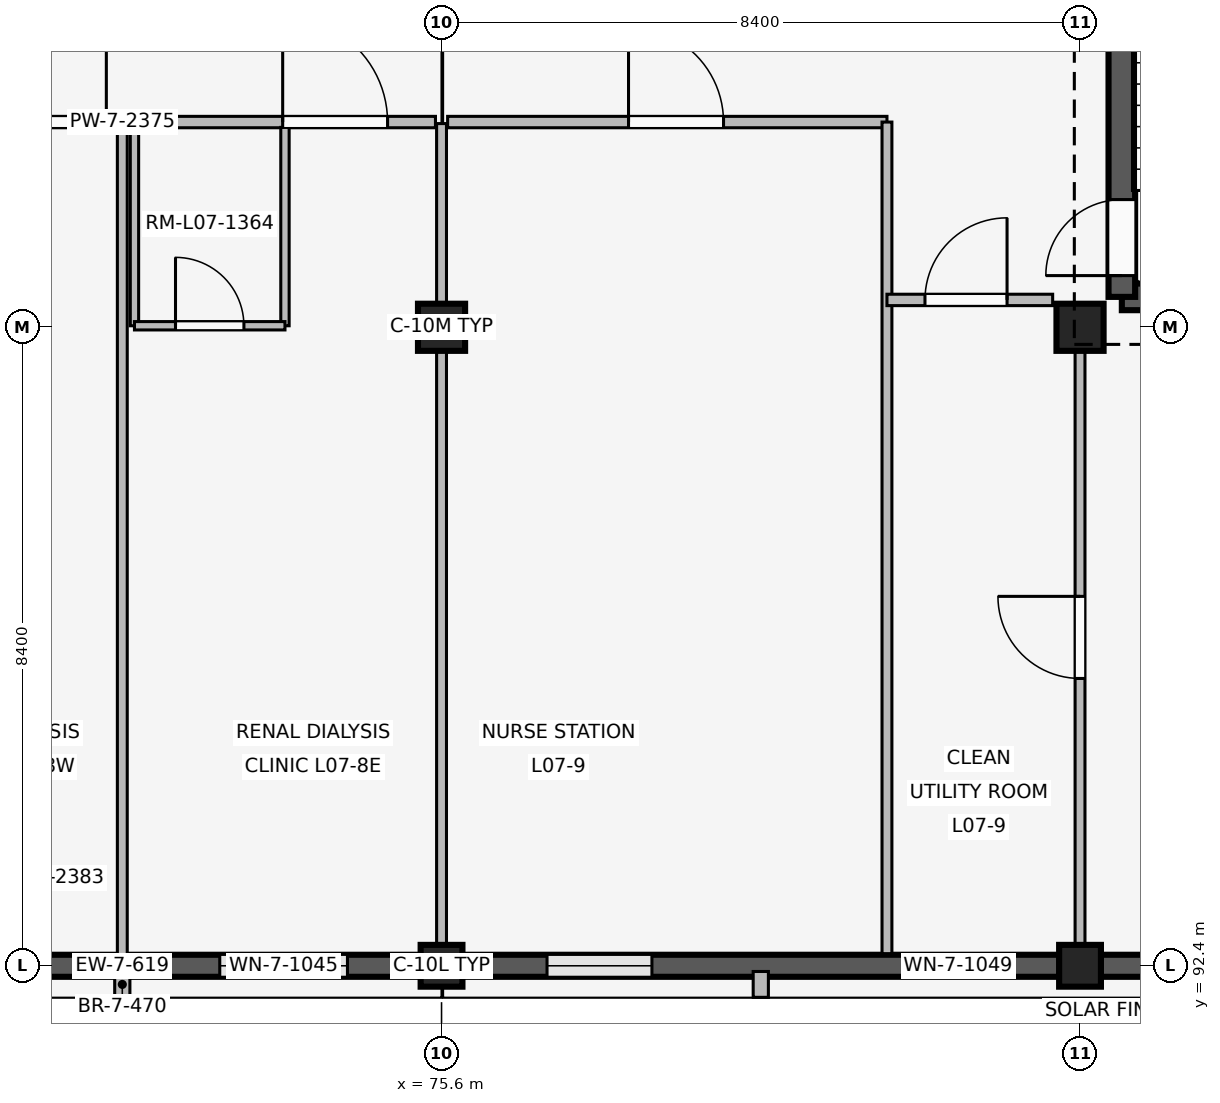
"""IFC4 building model, lengths in metres.
Left out: names, types, materials, properties, quantities, classifications, styles, units other than length and angle.
Written with IfcOpenShell. Run it as: python <this file> out.ifc"""

import sys

from ifc_helpers import new_model, si_unit, direction, frame, frame_2d, origin, origin_2d, place, context, subcontext, project, spatial, rectangle, extrude, element, fill, save


model = new_model("IFC4")
c1 = context("Model", 3, precision=1e-05, world=origin(), true_north=direction((0.0, 1.0)))
c2 = subcontext(c1, "Body", "Model", "MODEL_VIEW")
j1 = project(units=[si_unit("LENGTHUNIT", "METRE"), si_unit("PLANEANGLEUNIT", "RADIAN")], contexts=[c1])
p1 = place(None, origin())
s1 = spatial("IfcSite", under=j1, at=p1, CompositionType="ELEMENT")
p2 = place(p1, origin())
s2 = spatial("IfcBuilding", under=s1, at=p2, CompositionType="ELEMENT")
p3 = place(p2, frame((0.0, 0.0, 28.8)))
s3 = spatial("IfcBuildingStorey", under=s2, at=p3, CompositionType="ELEMENT", Elevation=28.8)
p4 = place(p3, frame((75.6, 92.4, 0.0), z_axis=(0.0, 0.0, 1.0), x_axis=(1.0, 0.0, 0.0)))
e1 = element("IfcColumn", 1, at=p4, inside=s3, PredefinedType="COLUMN", context=c2, shape_type="SweptSolid", body=[
    extrude(rectangle(XDim=0.55, YDim=0.55, at=origin_2d()), origin(), (0.0, 0.0, 1.0), 4.2),
])
p5 = place(p3, frame((75.6, 100.8, 0.0), z_axis=(0.0, 0.0, 1.0), x_axis=(1.0, 0.0, 0.0)))
e2 = element("IfcColumn", 2, at=p5, inside=s3, PredefinedType="COLUMN", context=c2, shape_type="SweptSolid", body=[
    extrude(rectangle(XDim=0.62, YDim=0.62, at=origin_2d()), origin(), (0.0, 0.0, 1.0), 4.2),
])
p6 = place(p3, frame((84.0, 92.4, 0.0), z_axis=(0.0, 0.0, 1.0), x_axis=(1.0, 0.0, 0.0)))
e3 = element("IfcColumn", 3, at=p6, inside=s3, PredefinedType="COLUMN", context=c2, shape_type="SweptSolid", body=[
    extrude(rectangle(XDim=0.55, YDim=0.55, at=origin_2d()), origin(), (0.0, 0.0, 1.0), 4.2),
])
p7 = place(p3, frame((84.0, 100.8, 0.0), z_axis=(0.0, 0.0, 1.0), x_axis=(1.0, 0.0, 0.0)))
e4 = element("IfcColumn", 4, at=p7, inside=s3, PredefinedType="COLUMN", context=c2, shape_type="SweptSolid", body=[
    extrude(rectangle(XDim=0.62, YDim=0.62, at=origin_2d()), origin(), (0.0, 0.0, 1.0), 4.2),
])
p8 = place(p3, frame((75.33, 92.4, 0.0), z_axis=(0.0, 0.0, 1.0), x_axis=(-1.0, 0.0, 0.0)))
e5 = element("IfcWall", 5, at=p8, inside=s3, PredefinedType="SOLIDWALL", context=c2, shape_type="SweptSolid", body=[
    extrude(rectangle(XDim=7.86, YDim=0.29, at=frame_2d((3.93, 0.0))), origin(), (0.0, 0.0, 1.0), 3.34),
])
p9 = place(p8, frame((0.968, 0.0, 0.85)))
e6 = element("IfcOpeningElement", 6, at=p9, cuts=e5, PredefinedType="OPENING", context=c2, shape_type="SweptSolid", body=[
    extrude(rectangle(XDim=1.68, YDim=2.05, at=frame_2d((0.84, 1.025))), frame((0.0, 0.155, 0.0), z_axis=(0.0, -1.0, 0.0), x_axis=(1.0, 0.0, 0.0)), (0.0, 0.0, 1.0), 0.31),
])
p10 = place(p8, frame((5.212, 0.0, 0.85)))
e7 = element("IfcOpeningElement", 7, at=p10, cuts=e5, PredefinedType="OPENING", context=c2, shape_type="SweptSolid", body=[
    extrude(rectangle(XDim=1.68, YDim=2.05, at=frame_2d((0.84, 1.025))), frame((0.0, 0.155, 0.0), z_axis=(0.0, -1.0, 0.0), x_axis=(1.0, 0.0, 0.0)), (0.0, 0.0, 1.0), 0.31),
])
p11 = place(p3, frame((71.4, 92.325, 0.0), z_axis=(0.0, 0.0, 1.0), x_axis=(0.0, -1.0, 0.0)))
e8 = element("IfcWall", 8, at=p11, inside=s3, PredefinedType="ELEMENTEDWALL", context=c2, shape_type="SweptSolid", body=[
    extrude(rectangle(XDim=0.34, YDim=0.2, at=frame_2d((0.17, 0.0))), origin(), (0.0, 0.0, 1.0), 3.32),
])
p12 = place(p3, frame((83.73, 92.4, 0.0), z_axis=(0.0, 0.0, 1.0), x_axis=(-1.0, 0.0, 0.0)))
e9 = element("IfcWall", 9, at=p12, inside=s3, PredefinedType="SOLIDWALL", context=c2, shape_type="SweptSolid", body=[
    extrude(rectangle(XDim=7.86, YDim=0.29, at=frame_2d((3.93, 0.0))), origin(), (0.0, 0.0, 1.0), 3.34),
])
p13 = place(p12, frame((0.645, 0.0, 0.85)))
e10 = element("IfcOpeningElement", 10, at=p13, cuts=e9, PredefinedType="OPENING", context=c2, shape_type="SweptSolid", body=[
    extrude(rectangle(XDim=1.38, YDim=1.5, at=frame_2d((0.69, 0.75))), frame((0.0, 0.155, 0.0), z_axis=(0.0, -1.0, 0.0), x_axis=(1.0, 0.0, 0.0)), (0.0, 0.0, 1.0), 0.31),
])
p14 = place(p12, frame((5.362, 0.0, 0.85)))
e11 = element("IfcOpeningElement", 11, at=p14, cuts=e9, PredefinedType="OPENING", context=c2, shape_type="SweptSolid", body=[
    extrude(rectangle(XDim=1.38, YDim=1.5, at=frame_2d((0.69, 0.75))), frame((0.0, 0.155, 0.0), z_axis=(0.0, -1.0, 0.0), x_axis=(1.0, 0.0, 0.0)), (0.0, 0.0, 1.0), 0.31),
])
p15 = place(p3, frame((79.8, 92.325, 0.0), z_axis=(0.0, 0.0, 1.0), x_axis=(0.0, -1.0, 0.0)))
e12 = element("IfcWall", 12, at=p15, inside=s3, PredefinedType="ELEMENTEDWALL", context=c2, shape_type="SweptSolid", body=[
    extrude(rectangle(XDim=0.34, YDim=0.2, at=frame_2d((0.17, 0.0))), origin(), (0.0, 0.0, 1.0), 3.32),
])
p16 = place(p3, frame((92.13, 92.4, 0.0), z_axis=(0.0, 0.0, 1.0), x_axis=(-1.0, 0.0, 0.0)))
e13 = element("IfcWall", 13, at=p16, inside=s3, PredefinedType="SOLIDWALL", context=c2, shape_type="SweptSolid", body=[
    extrude(rectangle(XDim=7.86, YDim=0.29, at=frame_2d((3.93, 0.0))), origin(), (0.0, 0.0, 1.0), 3.34),
])
p17 = place(p16, frame((1.028, 0.0, 0.85)))
e14 = element("IfcOpeningElement", 14, at=p17, cuts=e13, PredefinedType="OPENING", context=c2, shape_type="SweptSolid", body=[
    extrude(rectangle(XDim=1.56, YDim=1.7, at=frame_2d((0.78, 0.85))), frame((0.0, 0.155, 0.0), z_axis=(0.0, -1.0, 0.0), x_axis=(1.0, 0.0, 0.0)), (0.0, 0.0, 1.0), 0.31),
])
p18 = place(p16, frame((5.272, 0.0, 0.85)))
e15 = element("IfcOpeningElement", 15, at=p18, cuts=e13, PredefinedType="OPENING", context=c2, shape_type="SweptSolid", body=[
    extrude(rectangle(XDim=1.56, YDim=1.7, at=frame_2d((0.78, 0.85))), frame((0.0, 0.155, 0.0), z_axis=(0.0, -1.0, 0.0), x_axis=(1.0, 0.0, 0.0)), (0.0, 0.0, 1.0), 0.31),
])
p19 = place(p3, frame((84.55, 101.2, 0.0), z_axis=(0.0, 0.0, 1.0), x_axis=(1.0, 0.0, 0.0)))
e16 = element("IfcWall", 16, at=p19, inside=s3, PredefinedType="SHEAR", context=c2, shape_type="SweptSolid", body=[
    extrude(rectangle(XDim=7.5, YDim=0.35, at=frame_2d((3.75, 0.0))), origin(), (0.0, 0.0, 1.0), 3.94),
])
p20 = place(p19, frame((4.85, 0.0, 0.0)))
e17 = element("IfcOpeningElement", 17, at=p20, cuts=e16, PredefinedType="OPENING", context=c2, shape_type="SweptSolid", body=[
    extrude(rectangle(XDim=1.2, YDim=2.2, at=frame_2d((0.6, 1.1))), frame((0.0, 0.185, 0.0), z_axis=(0.0, -1.0, 0.0), x_axis=(1.0, 0.0, 0.0)), (0.0, 0.0, 1.0), 0.37),
])
p21 = place(p3, frame((84.55, 101.2, 0.0), z_axis=(0.0, 0.0, 1.0), x_axis=(0.0, 1.0, 0.0)))
e18 = element("IfcWall", 18, at=p21, inside=s3, PredefinedType="SHEAR", context=c2, shape_type="SweptSolid", body=[
    extrude(rectangle(XDim=7.55, YDim=0.35, at=frame_2d((3.775, 0.0))), origin(), (0.0, 0.0, 1.0), 3.94),
])
p22 = place(p21, frame((0.28, 0.0, 0.0)))
e19 = element("IfcOpeningElement", 19, at=p22, cuts=e18, PredefinedType="OPENING", context=c2, shape_type="SweptSolid", body=[
    extrude(rectangle(XDim=1.0, YDim=2.15, at=frame_2d((0.5, 1.075))), frame((0.0, 0.185, 0.0), z_axis=(0.0, -1.0, 0.0), x_axis=(1.0, 0.0, 0.0)), (0.0, 0.0, 1.0), 0.37),
])
p23 = place(p3, frame((67.28, 103.5, 0.0), z_axis=(0.0, 0.0, 1.0), x_axis=(1.0, 0.0, 0.0)))
e20 = element("IfcWall", 20, at=p23, inside=s3, PredefinedType="PARTITIONING", context=c2, shape_type="SweptSolid", body=[
    extrude(rectangle(XDim=8.24, YDim=0.15, at=frame_2d((4.12, 0.0))), origin(), (0.0, 0.0, 1.0), 3.32),
])
p24 = place(p23, frame((2.53, 0.0, 0.0)))
e21 = element("IfcOpeningElement", 21, at=p24, cuts=e20, PredefinedType="OPENING", context=c2, shape_type="SweptSolid", body=[
    extrude(rectangle(XDim=1.38, YDim=2.25, at=frame_2d((0.69, 1.125))), frame((0.0, 0.085, 0.0), z_axis=(0.0, -1.0, 0.0), x_axis=(1.0, 0.0, 0.0)), (0.0, 0.0, 1.0), 0.17),
])
p25 = place(p23, frame((6.23, 0.0, 0.0)))
e22 = element("IfcOpeningElement", 22, at=p25, cuts=e20, PredefinedType="OPENING", context=c2, shape_type="SweptSolid", body=[
    extrude(rectangle(XDim=1.38, YDim=2.25, at=frame_2d((0.69, 1.125))), frame((0.0, 0.085, 0.0), z_axis=(0.0, -1.0, 0.0), x_axis=(1.0, 0.0, 0.0)), (0.0, 0.0, 1.0), 0.17),
])
p26 = place(p3, frame((71.4, 92.5, 0.0), z_axis=(0.0, 0.0, 1.0), x_axis=(0.0, 1.0, 0.0)))
e23 = element("IfcWall", 23, at=p26, inside=s3, PredefinedType="PARTITIONING", context=c2, shape_type="SweptSolid", body=[
    extrude(rectangle(XDim=10.93, YDim=0.13, at=frame_2d((5.465, 0.0))), origin(), (0.0, 0.0, 1.0), 3.32),
])
for number, where, z_axis, x_axis in (
    (24, (71.56, 100.82, 0.0), (0.0, 0.0, 1.0), (0.0, 1.0, 0.0)),
    (25, (73.54, 100.82, 0.0), (0.0, 0.0, 1.0), (0.0, 1.0, 0.0)),
):
    element("IfcWall", number, at=place(p3, frame(where, z_axis=z_axis, x_axis=x_axis)), inside=s3, PredefinedType="PARTITIONING", context=c2, shape_type="SweptSolid", body=[
        extrude(rectangle(XDim=2.61, YDim=0.11, at=frame_2d((1.305, 0.0))), origin(), (0.0, 0.0, 1.0), 3.32),
    ])
p27 = place(p3, frame((71.56, 100.82, 0.0), z_axis=(0.0, 0.0, 1.0), x_axis=(1.0, 0.0, 0.0)))
e26 = element("IfcWall", 26, at=p27, inside=s3, PredefinedType="PARTITIONING", context=c2, shape_type="SweptSolid", body=[
    extrude(rectangle(XDim=1.98, YDim=0.11, at=frame_2d((0.99, 0.0))), origin(), (0.0, 0.0, 1.0), 3.32),
])
p28 = place(p27, frame((0.54, 0.0, 0.0)))
e27 = element("IfcOpeningElement", 27, at=p28, cuts=e26, PredefinedType="OPENING", context=c2, shape_type="SweptSolid", body=[
    extrude(rectangle(XDim=0.9, YDim=2.1, at=frame_2d((0.45, 1.05))), frame((0.0, 0.065, 0.0), z_axis=(0.0, -1.0, 0.0), x_axis=(1.0, 0.0, 0.0)), (0.0, 0.0, 1.0), 0.13),
])
p29 = place(p3, frame((70.05, 93.55, 0.0), z_axis=(0.0, 0.0, 1.0), x_axis=(1.0, 0.0, 0.0)))
e28 = element("IfcWall", 28, at=p29, inside=s3, PredefinedType="PLUMBINGWALL", context=c2, shape_type="SweptSolid", body=[
    extrude(rectangle(XDim=0.9, YDim=0.24, at=frame_2d((0.45, 0.0))), origin(), (0.0, 0.0, 1.0), 3.32),
])
p30 = place(p3, frame((75.6, 92.54, 0.0), z_axis=(0.0, 0.0, 1.0), x_axis=(0.0, 1.0, 0.0)))
e29 = element("IfcWall", 29, at=p30, inside=s3, PredefinedType="PARTITIONING", context=c2, shape_type="SweptSolid", body=[
    extrude(rectangle(XDim=10.94, YDim=0.13, at=frame_2d((5.47, 0.0))), origin(), (0.0, 0.0, 1.0), 3.32),
])
p31 = place(p3, frame((75.68, 103.5, 0.0), z_axis=(0.0, 0.0, 1.0), x_axis=(1.0, 0.0, 0.0)))
e30 = element("IfcWall", 30, at=p31, inside=s3, PredefinedType="PARTITIONING", context=c2, shape_type="SweptSolid", body=[
    extrude(rectangle(XDim=5.78, YDim=0.15, at=frame_2d((2.89, 0.0))), origin(), (0.0, 0.0, 1.0), 3.32),
])
p32 = place(p31, frame((2.38, 0.0, 0.0)))
e31 = element("IfcOpeningElement", 31, at=p32, cuts=e30, PredefinedType="OPENING", context=c2, shape_type="SweptSolid", body=[
    extrude(rectangle(XDim=1.25, YDim=2.2, at=frame_2d((0.625, 1.1))), frame((0.0, 0.085, 0.0), z_axis=(0.0, -1.0, 0.0), x_axis=(1.0, 0.0, 0.0)), (0.0, 0.0, 1.0), 0.17),
])
p33 = place(p3, frame((81.46, 92.56, 0.0), z_axis=(0.0, 0.0, 1.0), x_axis=(0.0, 1.0, 0.0)))
e32 = element("IfcWall", 32, at=p33, inside=s3, PredefinedType="PARTITIONING", context=c2, shape_type="SweptSolid", body=[
    extrude(rectangle(XDim=10.94, YDim=0.13, at=frame_2d((5.47, 0.0))), origin(), (0.0, 0.0, 1.0), 3.32),
])
p34 = place(p3, frame((81.46, 101.16, 0.0), z_axis=(0.0, 0.0, 1.0), x_axis=(1.0, 0.0, 0.0)))
e33 = element("IfcWall", 33, at=p34, inside=s3, PredefinedType="PARTITIONING", context=c2, shape_type="SweptSolid", body=[
    extrude(rectangle(XDim=2.18, YDim=0.15, at=frame_2d((1.09, 0.0))), origin(), (0.0, 0.0, 1.0), 3.32),
])
p35 = place(p34, frame((0.5, 0.0, 0.0)))
e34 = element("IfcOpeningElement", 34, at=p35, cuts=e33, PredefinedType="OPENING", context=c2, shape_type="SweptSolid", body=[
    extrude(rectangle(XDim=1.08, YDim=2.15, at=frame_2d((0.54, 1.075))), frame((0.0, 0.085, 0.0), z_axis=(0.0, -1.0, 0.0), x_axis=(1.0, 0.0, 0.0)), (0.0, 0.0, 1.0), 0.17),
])
p36 = place(p3, frame((84.0, 92.54, 0.0), z_axis=(0.0, 0.0, 1.0), x_axis=(0.0, 1.0, 0.0)))
e35 = element("IfcWall", 35, at=p36, inside=s3, PredefinedType="PARTITIONING", context=c2, shape_type="SweptSolid", body=[
    extrude(rectangle(XDim=8.21, YDim=0.13, at=frame_2d((4.105, 0.0))), origin(), (0.0, 0.0, 1.0), 3.32),
])
p37 = place(p36, frame((3.64, 0.0, 0.0)))
e36 = element("IfcOpeningElement", 36, at=p37, cuts=e35, PredefinedType="OPENING", context=c2, shape_type="SweptSolid", body=[
    extrude(rectangle(XDim=1.08, YDim=2.15, at=frame_2d((0.54, 1.075))), frame((0.0, 0.075, 0.0), z_axis=(0.0, -1.0, 0.0), x_axis=(1.0, 0.0, 0.0)), (0.0, 0.0, 1.0), 0.15),
])
p38 = place(p9, origin())
e37 = element("IfcWindow", 37, at=p38, inside=s3, PartitioningType="SINGLE_PANEL", PredefinedType="WINDOW", context=c2, shape_type="SweptSolid", body=[
    extrude(rectangle(XDim=1.68, YDim=2.05, at=frame_2d((0.84, 1.025))), frame((0.0, 0.03, 0.0), z_axis=(0.0, -1.0, 0.0), x_axis=(1.0, 0.0, 0.0)), (0.0, 0.0, 1.0), 0.06),
])
fill(e6, e37)
p39 = place(p13, origin())
e38 = element("IfcWindow", 38, at=p39, inside=s3, PartitioningType="SINGLE_PANEL", PredefinedType="WINDOW", context=c2, shape_type="SweptSolid", body=[
    extrude(rectangle(XDim=1.38, YDim=1.5, at=frame_2d((0.69, 0.75))), frame((0.0, 0.03, 0.0), z_axis=(0.0, -1.0, 0.0), x_axis=(1.0, 0.0, 0.0)), (0.0, 0.0, 1.0), 0.06),
])
fill(e10, e38)
p40 = place(p14, origin())
e39 = element("IfcWindow", 39, at=p40, inside=s3, PartitioningType="SINGLE_PANEL", PredefinedType="WINDOW", context=c2, shape_type="SweptSolid", body=[
    extrude(rectangle(XDim=1.38, YDim=1.5, at=frame_2d((0.69, 0.75))), frame((0.0, 0.03, 0.0), z_axis=(0.0, -1.0, 0.0), x_axis=(1.0, 0.0, 0.0)), (0.0, 0.0, 1.0), 0.06),
])
fill(e11, e39)
p41 = place(p22, origin())
e40 = element("IfcDoor", 40, at=p41, inside=s3, OperationType="SINGLE_SWING_LEFT", PredefinedType="DOOR", context=c2, shape_type="SweptSolid", body=[
    extrude(rectangle(XDim=1.0, YDim=2.15, at=frame_2d((0.5, 1.075))), frame((0.0, 0.025, 0.0), z_axis=(0.0, -1.0, 0.0), x_axis=(1.0, 0.0, 0.0)), (0.0, 0.0, 1.0), 0.05),
])
fill(e19, e40)
p42 = place(p24, origin())
e41 = element("IfcDoor", 41, at=p42, inside=s3, OperationType="SINGLE_SWING_RIGHT", PredefinedType="DOOR", context=c2, shape_type="SweptSolid", body=[
    extrude(rectangle(XDim=1.38, YDim=2.25, at=frame_2d((0.69, 1.125))), frame((0.0, 0.025, 0.0), z_axis=(0.0, -1.0, 0.0), x_axis=(1.0, 0.0, 0.0)), (0.0, 0.0, 1.0), 0.05),
])
fill(e21, e41)
p43 = place(p25, origin())
e42 = element("IfcDoor", 42, at=p43, inside=s3, OperationType="SINGLE_SWING_LEFT", PredefinedType="DOOR", context=c2, shape_type="SweptSolid", body=[
    extrude(rectangle(XDim=1.38, YDim=2.25, at=frame_2d((0.69, 1.125))), frame((0.0, 0.025, 0.0), z_axis=(0.0, -1.0, 0.0), x_axis=(1.0, 0.0, 0.0)), (0.0, 0.0, 1.0), 0.05),
])
fill(e22, e42)
p44 = place(p28, origin())
e43 = element("IfcDoor", 43, at=p44, inside=s3, OperationType="SINGLE_SWING_LEFT", PredefinedType="DOOR", context=c2, shape_type="SweptSolid", body=[
    extrude(rectangle(XDim=0.9, YDim=2.1, at=frame_2d((0.45, 1.05))), frame((0.0, 0.025, 0.0), z_axis=(0.0, -1.0, 0.0), x_axis=(1.0, 0.0, 0.0)), (0.0, 0.0, 1.0), 0.05),
])
fill(e27, e43)
p45 = place(p32, origin())
e44 = element("IfcDoor", 44, at=p45, inside=s3, OperationType="SINGLE_SWING_LEFT", PredefinedType="DOOR", context=c2, shape_type="SweptSolid", body=[
    extrude(rectangle(XDim=1.25, YDim=2.2, at=frame_2d((0.625, 1.1))), frame((0.0, 0.025, 0.0), z_axis=(0.0, -1.0, 0.0), x_axis=(1.0, 0.0, 0.0)), (0.0, 0.0, 1.0), 0.05),
])
fill(e31, e44)
p46 = place(p35, origin())
e45 = element("IfcDoor", 45, at=p46, inside=s3, OperationType="SINGLE_SWING_RIGHT", PredefinedType="DOOR", context=c2, shape_type="SweptSolid", body=[
    extrude(rectangle(XDim=1.08, YDim=2.15, at=frame_2d((0.54, 1.075))), frame((0.0, 0.025, 0.0), z_axis=(0.0, -1.0, 0.0), x_axis=(1.0, 0.0, 0.0)), (0.0, 0.0, 1.0), 0.05),
])
fill(e34, e45)
p47 = place(p37, origin())
e46 = element("IfcDoor", 46, at=p47, inside=s3, OperationType="SINGLE_SWING_RIGHT", PredefinedType="DOOR", context=c2, shape_type="SweptSolid", body=[
    extrude(rectangle(XDim=1.08, YDim=2.15, at=frame_2d((0.54, 1.075))), frame((0.0, 0.025, 0.0), z_axis=(0.0, -1.0, 0.0), x_axis=(1.0, 0.0, 0.0)), (0.0, 0.0, 1.0), 0.05),
])
fill(e36, e46)
save(model, sys.argv[1])
